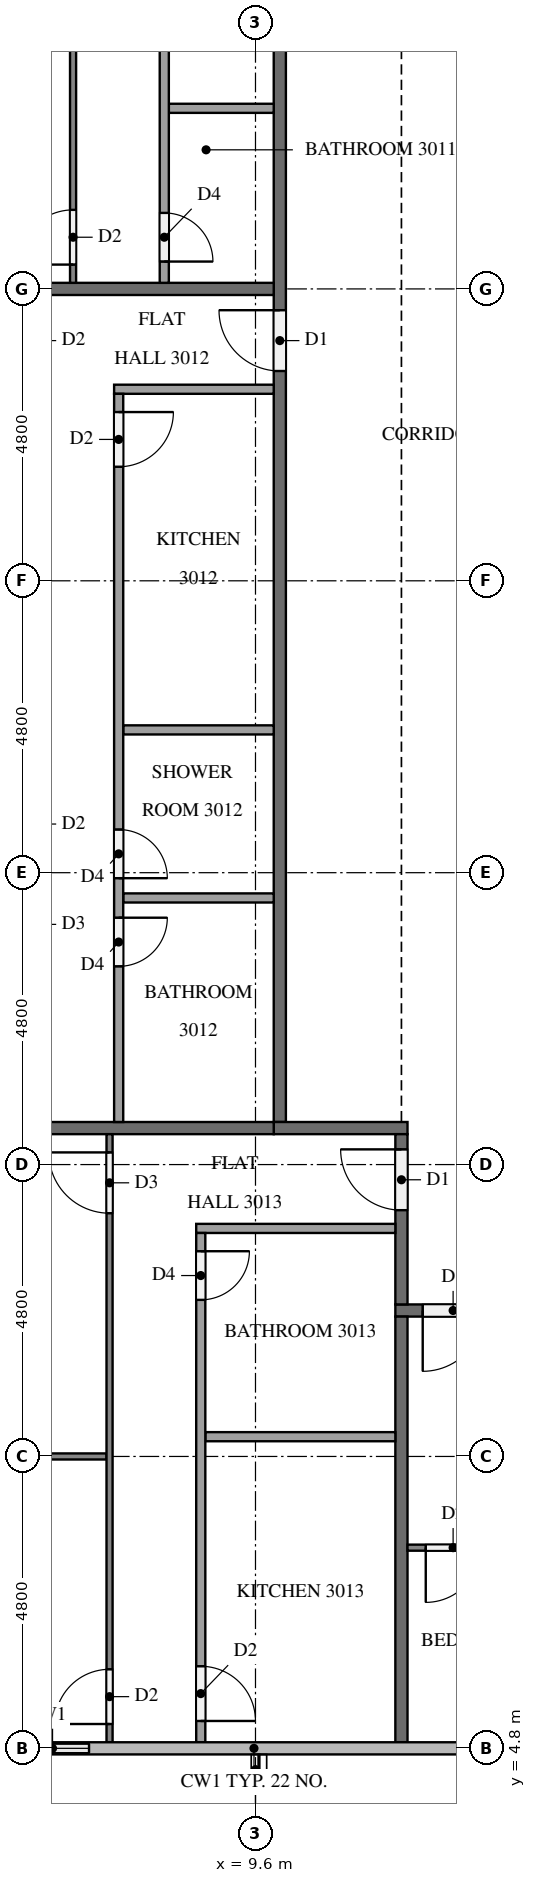
"""IFC4 building model, lengths in metres.
Left out: names, types, materials, properties, quantities, classifications, styles, units other than length and angle.
Written with IfcOpenShell. Run it as: python <this file> out.ifc"""

import sys

from ifc_helpers import new_model, si_unit, direction, frame, frame_2d, origin, place, context, subcontext, project, spatial, rectangle, extrude, element, fill, save


model = new_model("IFC4")
c1 = context("Model", 3, precision=1e-05, world=origin(), true_north=direction((0.0, 1.0)))
c2 = subcontext(c1, "Body", "Model", "MODEL_VIEW")
j1 = project(units=[si_unit("LENGTHUNIT", "METRE"), si_unit("PLANEANGLEUNIT", "RADIAN")], contexts=[c1])
p1 = place(None, origin())
s1 = spatial("IfcSite", under=j1, at=p1, CompositionType="ELEMENT")
p2 = place(p1, origin())
s2 = spatial("IfcBuilding", under=s1, at=p2, CompositionType="ELEMENT")
p3 = place(p2, frame((0.0, 0.0, 119.1)))
s3 = spatial("IfcBuildingStorey", under=s2, at=p3, CompositionType="ELEMENT", Elevation=119.1)
p4 = place(p3, frame((5.325, 4.8, 0.0), z_axis=(0.0, 0.0, 1.0), x_axis=(1.0, 0.0, 0.0)))
e1 = element("IfcWall", 1, at=p4, inside=s3, PredefinedType="SOLIDWALL", context=c2, shape_type="SweptSolid", body=[
    extrude(rectangle(XDim=1.875, YDim=0.15, at=frame_2d((0.938, 0.0))), origin(), (0.0, 0.0, 1.0), 3.2),
])
p5 = place(p4, frame((0.337, 0.0, 0.9)))
e2 = element("IfcOpeningElement", 2, at=p5, cuts=e1, PredefinedType="OPENING", context=c2, shape_type="SweptSolid", body=[
    extrude(rectangle(XDim=1.2, YDim=1.4, at=frame_2d((0.6, 0.7))), frame((0.0, 0.085, 0.0), z_axis=(0.0, -1.0, 0.0), x_axis=(1.0, 0.0, 0.0)), (0.0, 0.0, 1.0), 0.17),
])
p6 = place(p3, frame((50.5, 12.0, 0.0), z_axis=(0.0, 0.0, 1.0), x_axis=(-1.0, 0.0, 0.0)))
e3 = element("IfcWall", 3, at=p6, inside=s3, PredefinedType="PARTITIONING", context=c2, shape_type="SweptSolid", body=[
    extrude(rectangle(XDim=38.6, YDim=0.2, at=frame_2d((19.3, 0.0))), origin(), (0.0, 0.0, 1.0), 3.2),
])
p7 = place(p6, frame((37.15, 0.0, 0.0)))
e4 = element("IfcOpeningElement", 4, at=p7, cuts=e3, PredefinedType="OPENING", context=c2, shape_type="SweptSolid", body=[
    extrude(rectangle(XDim=1.0, YDim=2.1, at=frame_2d((0.5, 1.05))), frame((0.0, 0.11, 0.0), z_axis=(0.0, -1.0, 0.0), x_axis=(1.0, 0.0, 0.0)), (0.0, 0.0, 1.0), 0.22),
])
p8 = place(p6, frame((7.65, 0.0, 0.0)))
e5 = element("IfcOpeningElement", 5, at=p8, cuts=e3, PredefinedType="OPENING", context=c2, shape_type="SweptSolid", body=[
    extrude(rectangle(XDim=1.0, YDim=2.1, at=frame_2d((0.5, 1.05))), frame((0.0, 0.11, 0.0), z_axis=(0.0, -1.0, 0.0), x_axis=(1.0, 0.0, 0.0)), (0.0, 0.0, 1.0), 0.22),
])
p9 = place(p6, frame((5.95, 0.0, 0.0)))
e6 = element("IfcOpeningElement", 6, at=p9, cuts=e3, PredefinedType="OPENING", context=c2, shape_type="SweptSolid", body=[
    extrude(rectangle(XDim=1.0, YDim=2.1, at=frame_2d((0.5, 1.05))), frame((0.0, 0.11, 0.0), z_axis=(0.0, -1.0, 0.0), x_axis=(1.0, 0.0, 0.0)), (0.0, 0.0, 1.0), 0.22),
])
p10 = place(p3, frame((10.0, 15.1, 0.0), z_axis=(0.0, 0.0, 1.0), x_axis=(0.0, 1.0, 0.0)))
e7 = element("IfcWall", 7, at=p10, inside=s3, PredefinedType="PARTITIONING", context=c2, shape_type="SweptSolid", body=[
    extrude(rectangle(XDim=22.6, YDim=0.2, at=frame_2d((11.3, 0.0))), origin(), (0.0, 0.0, 1.0), 3.2),
])
p11 = place(p10, frame((21.35, 0.0, 0.0)))
e8 = element("IfcOpeningElement", 8, at=p11, cuts=e7, PredefinedType="OPENING", context=c2, shape_type="SweptSolid", body=[
    extrude(rectangle(XDim=1.0, YDim=2.1, at=frame_2d((0.5, 1.05))), frame((0.0, 0.11, 0.0), z_axis=(0.0, -1.0, 0.0), x_axis=(1.0, 0.0, 0.0)), (0.0, 0.0, 1.0), 0.22),
])
p12 = place(p10, frame((12.35, 0.0, 0.0)))
e9 = element("IfcOpeningElement", 9, at=p12, cuts=e7, PredefinedType="OPENING", context=c2, shape_type="SweptSolid", body=[
    extrude(rectangle(XDim=1.0, YDim=2.1, at=frame_2d((0.5, 1.05))), frame((0.0, 0.11, 0.0), z_axis=(0.0, -1.0, 0.0), x_axis=(1.0, 0.0, 0.0)), (0.0, 0.0, 1.0), 0.22),
])
p13 = place(p3, frame((9.9, 15.0, 0.0), z_axis=(0.0, 0.0, 1.0), x_axis=(1.0, 0.0, 0.0)))
e10 = element("IfcWall", 10, at=p13, inside=s3, PredefinedType="PARTITIONING", context=c2, shape_type="SweptSolid", body=[
    extrude(rectangle(XDim=2.2, YDim=0.2, at=frame_2d((1.1, 0.0))), origin(), (0.0, 0.0, 1.0), 3.2),
])
p14 = place(p3, frame((12.0, 12.1, 0.0), z_axis=(0.0, 0.0, 1.0), x_axis=(0.0, 1.0, 0.0)))
e11 = element("IfcWall", 11, at=p14, inside=s3, PredefinedType="PARTITIONING", context=c2, shape_type="SweptSolid", body=[
    extrude(rectangle(XDim=2.8, YDim=0.2, at=frame_2d((1.4, 0.0))), origin(), (0.0, 0.0, 1.0), 3.2),
])
p15 = place(p14, frame((1.55, 0.0, 0.0)))
e12 = element("IfcOpeningElement", 12, at=p15, cuts=e11, PredefinedType="OPENING", context=c2, shape_type="SweptSolid", body=[
    extrude(rectangle(XDim=1.0, YDim=2.1, at=frame_2d((0.5, 1.05))), frame((0.0, 0.11, 0.0), z_axis=(0.0, -1.0, 0.0), x_axis=(1.0, 0.0, 0.0)), (0.0, 0.0, 1.0), 0.22),
])
p16 = place(p3, frame((12.0, 4.9, 0.0), z_axis=(0.0, 0.0, 1.0), x_axis=(0.0, 1.0, 0.0)))
e13 = element("IfcWall", 13, at=p16, inside=s3, PredefinedType="PARTITIONING", context=c2, shape_type="SweptSolid", body=[
    extrude(rectangle(XDim=7.0, YDim=0.2, at=frame_2d((3.5, 0.0))), origin(), (0.0, 0.0, 1.0), 3.2),
])
p17 = place(p3, frame((0.375, 28.8, 0.0), z_axis=(0.0, 0.0, 1.0), x_axis=(1.0, 0.0, 0.0)))
e14 = element("IfcWall", 14, at=p17, inside=s3, PredefinedType="PARTITIONING", context=c2, shape_type="SweptSolid", body=[
    extrude(rectangle(XDim=9.525, YDim=0.2, at=frame_2d((4.762, 0.0))), origin(), (0.0, 0.0, 1.0), 3.2),
])
p18 = place(p3, frame((0.1, 15.0, 0.0), z_axis=(0.0, 0.0, 1.0), x_axis=(1.0, 0.0, 0.0)))
e15 = element("IfcWall", 15, at=p18, inside=s3, PredefinedType="PARTITIONING", context=c2, shape_type="SweptSolid", body=[
    extrude(rectangle(XDim=9.8, YDim=0.2, at=frame_2d((4.9, 0.0))), origin(), (0.0, 0.0, 1.0), 3.2),
])
p19 = place(p3, frame((26.3, 8.1, 0.0), z_axis=(0.0, 0.0, 1.0), x_axis=(-1.0, 0.0, 0.0)))
e16 = element("IfcWall", 16, at=p19, inside=s3, PredefinedType="PARTITIONING", context=c2, shape_type="SweptSolid", body=[
    extrude(rectangle(XDim=14.2, YDim=0.1, at=frame_2d((7.1, 0.0))), origin(), (0.0, 0.0, 1.0), 3.2),
])
p20 = place(p19, frame((13.0, 0.0, 0.0)))
e17 = element("IfcOpeningElement", 17, at=p20, cuts=e16, PredefinedType="OPENING", context=c2, shape_type="SweptSolid", body=[
    extrude(rectangle(XDim=0.9, YDim=2.1, at=frame_2d((0.45, 1.05))), frame((0.0, 0.06, 0.0), z_axis=(0.0, -1.0, 0.0), x_axis=(1.0, 0.0, 0.0)), (0.0, 0.0, 1.0), 0.12),
])
p21 = place(p19, frame((5.05, 0.0, 0.0)))
e18 = element("IfcOpeningElement", 18, at=p21, cuts=e16, PredefinedType="OPENING", context=c2, shape_type="SweptSolid", body=[
    extrude(rectangle(XDim=0.9, YDim=2.1, at=frame_2d((0.45, 1.05))), frame((0.0, 0.06, 0.0), z_axis=(0.0, -1.0, 0.0), x_axis=(1.0, 0.0, 0.0)), (0.0, 0.0, 1.0), 0.12),
])
p22 = place(p19, frame((3.35, 0.0, 0.0)))
e19 = element("IfcOpeningElement", 19, at=p22, cuts=e16, PredefinedType="OPENING", context=c2, shape_type="SweptSolid", body=[
    extrude(rectangle(XDim=1.0, YDim=2.1, at=frame_2d((0.5, 1.05))), frame((0.0, 0.06, 0.0), z_axis=(0.0, -1.0, 0.0), x_axis=(1.0, 0.0, 0.0)), (0.0, 0.0, 1.0), 0.12),
])
p23 = place(p3, frame((6.6, 28.9, 0.0), z_axis=(0.0, 0.0, 1.0), x_axis=(0.0, 1.0, 0.0)))
e20 = element("IfcWall", 20, at=p23, inside=s3, PredefinedType="PARTITIONING", context=c2, shape_type="SweptSolid", body=[
    extrude(rectangle(XDim=8.8, YDim=0.1, at=frame_2d((4.4, 0.0))), origin(), (0.0, 0.0, 1.0), 3.2),
])
p24 = place(p23, frame((7.5, 0.0, 0.0)))
e21 = element("IfcOpeningElement", 21, at=p24, cuts=e20, PredefinedType="OPENING", context=c2, shape_type="SweptSolid", body=[
    extrude(rectangle(XDim=1.0, YDim=2.1, at=frame_2d((0.5, 1.05))), frame((0.0, 0.06, 0.0), z_axis=(0.0, -1.0, 0.0), x_axis=(1.0, 0.0, 0.0)), (0.0, 0.0, 1.0), 0.12),
])
p25 = place(p23, frame((0.3, 0.0, 0.0)))
e22 = element("IfcOpeningElement", 22, at=p25, cuts=e20, PredefinedType="OPENING", context=c2, shape_type="SweptSolid", body=[
    extrude(rectangle(XDim=0.9, YDim=2.1, at=frame_2d((0.45, 1.05))), frame((0.0, 0.06, 0.0), z_axis=(0.0, -1.0, 0.0), x_axis=(1.0, 0.0, 0.0)), (0.0, 0.0, 1.0), 0.12),
])
p26 = place(p3, frame((9.9, 31.77, 0.0), z_axis=(0.0, 0.0, 1.0), x_axis=(-1.0, 0.0, 0.0)))
e23 = element("IfcWall", 23, at=p26, inside=s3, PredefinedType="PARTITIONING", context=c2, shape_type="SweptSolid", body=[
    extrude(rectangle(XDim=1.725, YDim=0.15, at=frame_2d((0.862, 0.0))), origin(), (0.0, 0.0, 1.0), 3.2),
])
p27 = place(p3, frame((8.1, 36.075, 0.0), z_axis=(0.0, 0.0, 1.0), x_axis=(0.0, -1.0, 0.0)))
e24 = element("IfcWall", 24, at=p27, inside=s3, PredefinedType="PARTITIONING", context=c2, shape_type="SweptSolid", body=[
    extrude(rectangle(XDim=7.175, YDim=0.15, at=frame_2d((3.587, 0.0))), origin(), (0.0, 0.0, 1.0), 3.2),
])
p28 = place(p27, frame((0.3, 0.0, 0.0)))
e25 = element("IfcOpeningElement", 25, at=p28, cuts=e24, PredefinedType="OPENING", context=c2, shape_type="SweptSolid", body=[
    extrude(rectangle(XDim=0.9, YDim=2.1, at=frame_2d((0.45, 1.05))), frame((0.0, 0.085, 0.0), z_axis=(0.0, -1.0, 0.0), x_axis=(1.0, 0.0, 0.0)), (0.0, 0.0, 1.0), 0.17),
])
p29 = place(p27, frame((6.025, 0.0, 0.0)))
e26 = element("IfcOpeningElement", 26, at=p29, cuts=e24, PredefinedType="OPENING", context=c2, shape_type="SweptSolid", body=[
    extrude(rectangle(XDim=0.8, YDim=2.1, at=frame_2d((0.4, 1.05))), frame((0.0, 0.085, 0.0), z_axis=(0.0, -1.0, 0.0), x_axis=(1.0, 0.0, 0.0)), (0.0, 0.0, 1.0), 0.17),
])
for number, where, z_axis, x_axis in (
    (27, (9.9, 21.548, 0.0), (0.0, 0.0, 1.0), (-1.0, 0.0, 0.0)),
    (28, (9.9, 18.785, 0.0), (0.0, 0.0, 1.0), (-1.0, 0.0, 0.0)),
):
    element("IfcWall", number, at=place(p3, frame(where, z_axis=z_axis, x_axis=x_axis)), inside=s3, PredefinedType="PARTITIONING", context=c2, shape_type="SweptSolid", body=[
        extrude(rectangle(XDim=2.475, YDim=0.15, at=frame_2d((1.237, 0.0))), origin(), (0.0, 0.0, 1.0), 3.2),
    ])
p30 = place(p3, frame((9.9, 27.15, 0.0), z_axis=(0.0, 0.0, 1.0), x_axis=(-1.0, 0.0, 0.0)))
e29 = element("IfcWall", 29, at=p30, inside=s3, PredefinedType="PARTITIONING", context=c2, shape_type="SweptSolid", body=[
    extrude(rectangle(XDim=2.625, YDim=0.15, at=frame_2d((1.312, 0.0))), origin(), (0.0, 0.0, 1.0), 3.2),
])
p31 = place(p3, frame((7.35, 27.075, 0.0), z_axis=(0.0, 0.0, 1.0), x_axis=(0.0, -1.0, 0.0)))
e30 = element("IfcWall", 30, at=p31, inside=s3, PredefinedType="PARTITIONING", context=c2, shape_type="SweptSolid", body=[
    extrude(rectangle(XDim=11.975, YDim=0.15, at=frame_2d((5.987, 0.0))), origin(), (0.0, 0.0, 1.0), 3.2),
])
p32 = place(p31, frame((0.3, 0.0, 0.0)))
e31 = element("IfcOpeningElement", 31, at=p32, cuts=e30, PredefinedType="OPENING", context=c2, shape_type="SweptSolid", body=[
    extrude(rectangle(XDim=0.9, YDim=2.1, at=frame_2d((0.45, 1.05))), frame((0.0, 0.085, 0.0), z_axis=(0.0, -1.0, 0.0), x_axis=(1.0, 0.0, 0.0)), (0.0, 0.0, 1.0), 0.17),
])
p33 = place(p31, frame((7.165, 0.0, 0.0)))
e32 = element("IfcOpeningElement", 32, at=p33, cuts=e30, PredefinedType="OPENING", context=c2, shape_type="SweptSolid", body=[
    extrude(rectangle(XDim=0.8, YDim=2.1, at=frame_2d((0.4, 1.05))), frame((0.0, 0.085, 0.0), z_axis=(0.0, -1.0, 0.0), x_axis=(1.0, 0.0, 0.0)), (0.0, 0.0, 1.0), 0.17),
])
p34 = place(p31, frame((8.615, 0.0, 0.0)))
e33 = element("IfcOpeningElement", 33, at=p34, cuts=e30, PredefinedType="OPENING", context=c2, shape_type="SweptSolid", body=[
    extrude(rectangle(XDim=0.8, YDim=2.1, at=frame_2d((0.4, 1.05))), frame((0.0, 0.085, 0.0), z_axis=(0.0, -1.0, 0.0), x_axis=(1.0, 0.0, 0.0)), (0.0, 0.0, 1.0), 0.17),
])
p35 = place(p3, frame((7.15, 9.6, 0.0), z_axis=(0.0, 0.0, 1.0), x_axis=(-1.0, 0.0, 0.0)))
e34 = element("IfcWall", 34, at=p35, inside=s3, PredefinedType="PARTITIONING", context=c2, shape_type="SweptSolid", body=[
    extrude(rectangle(XDim=6.625, YDim=0.1, at=frame_2d((3.312, 0.0))), origin(), (0.0, 0.0, 1.0), 3.2),
])
p36 = place(p3, frame((7.2, 4.9, 0.0), z_axis=(0.0, 0.0, 1.0), x_axis=(0.0, 1.0, 0.0)))
e35 = element("IfcWall", 35, at=p36, inside=s3, PredefinedType="PARTITIONING", context=c2, shape_type="SweptSolid", body=[
    extrude(rectangle(XDim=10.0, YDim=0.1, at=frame_2d((5.0, 0.0))), origin(), (0.0, 0.0, 1.0), 3.2),
])
p37 = place(p36, frame((8.7, 0.0, 0.0)))
e36 = element("IfcOpeningElement", 36, at=p37, cuts=e35, PredefinedType="OPENING", context=c2, shape_type="SweptSolid", body=[
    extrude(rectangle(XDim=1.0, YDim=2.1, at=frame_2d((0.5, 1.05))), frame((0.0, 0.06, 0.0), z_axis=(0.0, -1.0, 0.0), x_axis=(1.0, 0.0, 0.0)), (0.0, 0.0, 1.0), 0.12),
])
p38 = place(p36, frame((0.3, 0.0, 0.0)))
e37 = element("IfcOpeningElement", 37, at=p38, cuts=e35, PredefinedType="OPENING", context=c2, shape_type="SweptSolid", body=[
    extrude(rectangle(XDim=0.9, YDim=2.1, at=frame_2d((0.45, 1.05))), frame((0.0, 0.06, 0.0), z_axis=(0.0, -1.0, 0.0), x_axis=(1.0, 0.0, 0.0)), (0.0, 0.0, 1.0), 0.12),
])
p39 = place(p3, frame((11.9, 9.925, 0.0), z_axis=(0.0, 0.0, 1.0), x_axis=(-1.0, 0.0, 0.0)))
e38 = element("IfcWall", 38, at=p39, inside=s3, PredefinedType="PARTITIONING", context=c2, shape_type="SweptSolid", body=[
    extrude(rectangle(XDim=3.125, YDim=0.15, at=frame_2d((1.562, 0.0))), origin(), (0.0, 0.0, 1.0), 3.2),
])
p40 = place(p3, frame((11.9, 13.35, 0.0), z_axis=(0.0, 0.0, 1.0), x_axis=(-1.0, 0.0, 0.0)))
e39 = element("IfcWall", 39, at=p40, inside=s3, PredefinedType="PARTITIONING", context=c2, shape_type="SweptSolid", body=[
    extrude(rectangle(XDim=3.275, YDim=0.15, at=frame_2d((1.637, 0.0))), origin(), (0.0, 0.0, 1.0), 3.2),
])
p41 = place(p3, frame((8.7, 13.275, 0.0), z_axis=(0.0, 0.0, 1.0), x_axis=(0.0, -1.0, 0.0)))
e40 = element("IfcWall", 40, at=p41, inside=s3, PredefinedType="PARTITIONING", context=c2, shape_type="SweptSolid", body=[
    extrude(rectangle(XDim=8.375, YDim=0.15, at=frame_2d((4.188, 0.0))), origin(), (0.0, 0.0, 1.0), 3.2),
])
p42 = place(p41, frame((0.3, 0.0, 0.0)))
e41 = element("IfcOpeningElement", 41, at=p42, cuts=e40, PredefinedType="OPENING", context=c2, shape_type="SweptSolid", body=[
    extrude(rectangle(XDim=0.8, YDim=2.1, at=frame_2d((0.4, 1.05))), frame((0.0, 0.085, 0.0), z_axis=(0.0, -1.0, 0.0), x_axis=(1.0, 0.0, 0.0)), (0.0, 0.0, 1.0), 0.17),
])
p43 = place(p41, frame((7.125, 0.0, 0.0)))
e42 = element("IfcOpeningElement", 42, at=p43, cuts=e40, PredefinedType="OPENING", context=c2, shape_type="SweptSolid", body=[
    extrude(rectangle(XDim=0.9, YDim=2.1, at=frame_2d((0.45, 1.05))), frame((0.0, 0.085, 0.0), z_axis=(0.0, -1.0, 0.0), x_axis=(1.0, 0.0, 0.0)), (0.0, 0.0, 1.0), 0.17),
])
p44 = place(p5, origin())
e43 = element("IfcWindow", 43, at=p44, inside=s3, PartitioningType="SINGLE_PANEL", PredefinedType="WINDOW", context=c2, shape_type="SweptSolid", body=[
    extrude(rectangle(XDim=1.2, YDim=1.4, at=frame_2d((0.6, 0.7))), frame((0.0, 0.03, 0.0), z_axis=(0.0, -1.0, 0.0), x_axis=(1.0, 0.0, 0.0)), (0.0, 0.0, 1.0), 0.06),
])
fill(e2, e43)
p45 = place(p7, origin())
e44 = element("IfcDoor", 44, at=p45, inside=s3, OperationType="SINGLE_SWING_RIGHT", PredefinedType="DOOR", context=c2, shape_type="SweptSolid", body=[
    extrude(rectangle(XDim=1.0, YDim=2.1, at=frame_2d((0.5, 1.05))), frame((0.0, 0.025, 0.0), z_axis=(0.0, -1.0, 0.0), x_axis=(1.0, 0.0, 0.0)), (0.0, 0.0, 1.0), 0.05),
])
fill(e4, e44)
p46 = place(p12, origin())
e45 = element("IfcDoor", 45, at=p46, inside=s3, OperationType="SINGLE_SWING_RIGHT", PredefinedType="DOOR", context=c2, shape_type="SweptSolid", body=[
    extrude(rectangle(XDim=1.0, YDim=2.1, at=frame_2d((0.5, 1.05))), frame((0.0, 0.025, 0.0), z_axis=(0.0, -1.0, 0.0), x_axis=(1.0, 0.0, 0.0)), (0.0, 0.0, 1.0), 0.05),
])
fill(e9, e45)
p47 = place(p15, origin())
e46 = element("IfcDoor", 46, at=p47, inside=s3, OperationType="SINGLE_SWING_RIGHT", PredefinedType="DOOR", context=c2, shape_type="SweptSolid", body=[
    extrude(rectangle(XDim=1.0, YDim=2.1, at=frame_2d((0.5, 1.05))), frame((0.0, 0.025, 0.0), z_axis=(0.0, -1.0, 0.0), x_axis=(1.0, 0.0, 0.0)), (0.0, 0.0, 1.0), 0.05),
])
fill(e12, e46)
p48 = place(p20, origin())
e47 = element("IfcDoor", 47, at=p48, inside=s3, OperationType="SINGLE_SWING_RIGHT", PredefinedType="DOOR", context=c2, shape_type="SweptSolid", body=[
    extrude(rectangle(XDim=0.9, YDim=2.1, at=frame_2d((0.45, 1.05))), frame((0.0, 0.025, 0.0), z_axis=(0.0, -1.0, 0.0), x_axis=(1.0, 0.0, 0.0)), (0.0, 0.0, 1.0), 0.05),
])
fill(e17, e47)
p49 = place(p25, origin())
e48 = element("IfcDoor", 48, at=p49, inside=s3, OperationType="SINGLE_SWING_LEFT", PredefinedType="DOOR", context=c2, shape_type="SweptSolid", body=[
    extrude(rectangle(XDim=0.9, YDim=2.1, at=frame_2d((0.45, 1.05))), frame((0.0, 0.025, 0.0), z_axis=(0.0, -1.0, 0.0), x_axis=(1.0, 0.0, 0.0)), (0.0, 0.0, 1.0), 0.05),
])
fill(e22, e48)
p50 = place(p29, origin())
e49 = element("IfcDoor", 49, at=p50, inside=s3, OperationType="SINGLE_SWING_RIGHT", PredefinedType="DOOR", context=c2, shape_type="SweptSolid", body=[
    extrude(rectangle(XDim=0.8, YDim=2.1, at=frame_2d((0.4, 1.05))), frame((0.0, 0.025, 0.0), z_axis=(0.0, -1.0, 0.0), x_axis=(1.0, 0.0, 0.0)), (0.0, 0.0, 1.0), 0.05),
])
fill(e26, e49)
p51 = place(p32, origin())
e50 = element("IfcDoor", 50, at=p51, inside=s3, OperationType="SINGLE_SWING_LEFT", PredefinedType="DOOR", context=c2, shape_type="SweptSolid", body=[
    extrude(rectangle(XDim=0.9, YDim=2.1, at=frame_2d((0.45, 1.05))), frame((0.0, 0.025, 0.0), z_axis=(0.0, -1.0, 0.0), x_axis=(1.0, 0.0, 0.0)), (0.0, 0.0, 1.0), 0.05),
])
fill(e31, e50)
p52 = place(p33, origin())
e51 = element("IfcDoor", 51, at=p52, inside=s3, OperationType="SINGLE_SWING_RIGHT", PredefinedType="DOOR", context=c2, shape_type="SweptSolid", body=[
    extrude(rectangle(XDim=0.8, YDim=2.1, at=frame_2d((0.4, 1.05))), frame((0.0, 0.025, 0.0), z_axis=(0.0, -1.0, 0.0), x_axis=(1.0, 0.0, 0.0)), (0.0, 0.0, 1.0), 0.05),
])
fill(e32, e51)
p53 = place(p34, origin())
e52 = element("IfcDoor", 52, at=p53, inside=s3, OperationType="SINGLE_SWING_LEFT", PredefinedType="DOOR", context=c2, shape_type="SweptSolid", body=[
    extrude(rectangle(XDim=0.8, YDim=2.1, at=frame_2d((0.4, 1.05))), frame((0.0, 0.025, 0.0), z_axis=(0.0, -1.0, 0.0), x_axis=(1.0, 0.0, 0.0)), (0.0, 0.0, 1.0), 0.05),
])
fill(e33, e52)
p54 = place(p37, origin())
e53 = element("IfcDoor", 53, at=p54, inside=s3, OperationType="SINGLE_SWING_RIGHT", PredefinedType="DOOR", context=c2, shape_type="SweptSolid", body=[
    extrude(rectangle(XDim=1.0, YDim=2.1, at=frame_2d((0.5, 1.05))), frame((0.0, 0.025, 0.0), z_axis=(0.0, -1.0, 0.0), x_axis=(1.0, 0.0, 0.0)), (0.0, 0.0, 1.0), 0.05),
])
fill(e36, e53)
p55 = place(p38, origin())
e54 = element("IfcDoor", 54, at=p55, inside=s3, OperationType="SINGLE_SWING_LEFT", PredefinedType="DOOR", context=c2, shape_type="SweptSolid", body=[
    extrude(rectangle(XDim=0.9, YDim=2.1, at=frame_2d((0.45, 1.05))), frame((0.0, 0.025, 0.0), z_axis=(0.0, -1.0, 0.0), x_axis=(1.0, 0.0, 0.0)), (0.0, 0.0, 1.0), 0.05),
])
fill(e37, e54)
p56 = place(p42, origin())
e55 = element("IfcDoor", 55, at=p56, inside=s3, OperationType="SINGLE_SWING_LEFT", PredefinedType="DOOR", context=c2, shape_type="SweptSolid", body=[
    extrude(rectangle(XDim=0.8, YDim=2.1, at=frame_2d((0.4, 1.05))), frame((0.0, 0.025, 0.0), z_axis=(0.0, -1.0, 0.0), x_axis=(1.0, 0.0, 0.0)), (0.0, 0.0, 1.0), 0.05),
])
fill(e41, e55)
p57 = place(p43, origin())
e56 = element("IfcDoor", 56, at=p57, inside=s3, OperationType="SINGLE_SWING_RIGHT", PredefinedType="DOOR", context=c2, shape_type="SweptSolid", body=[
    extrude(rectangle(XDim=0.9, YDim=2.1, at=frame_2d((0.45, 1.05))), frame((0.0, 0.025, 0.0), z_axis=(0.0, -1.0, 0.0), x_axis=(1.0, 0.0, 0.0)), (0.0, 0.0, 1.0), 0.05),
])
fill(e42, e56)
save(model, sys.argv[1])
